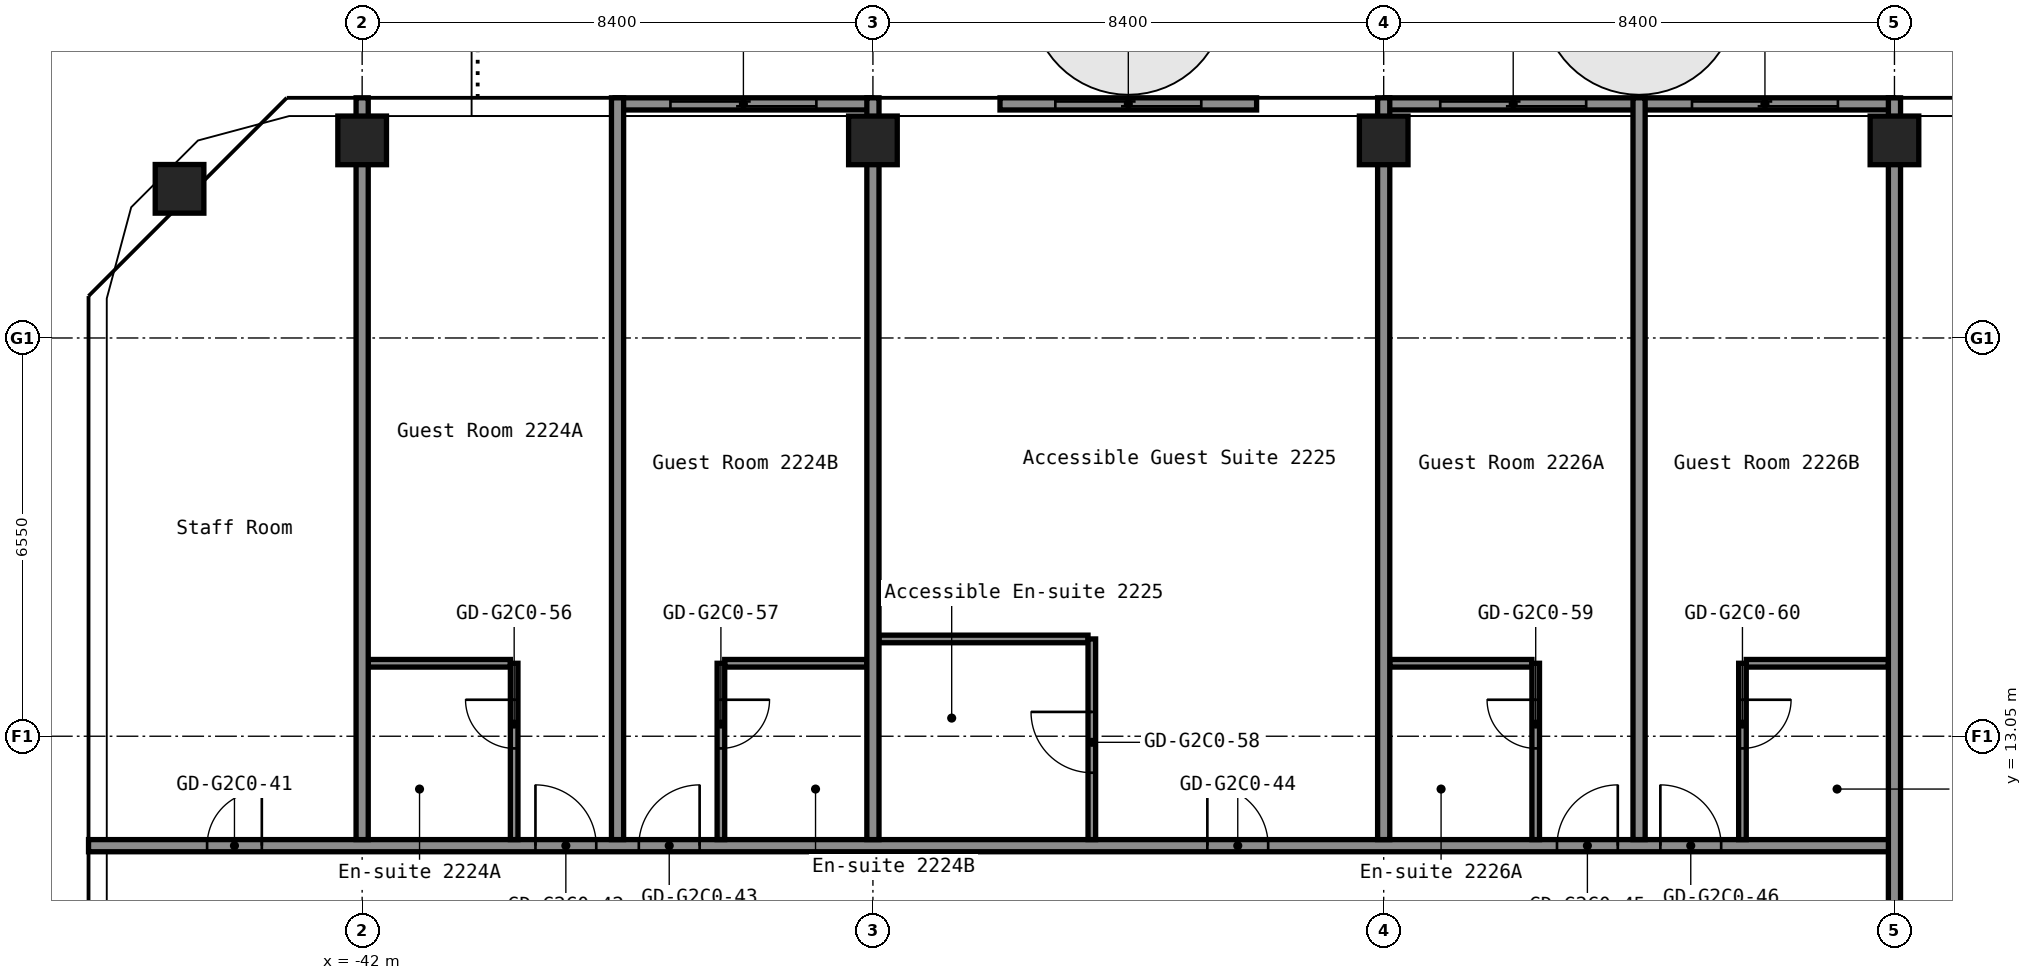
"""IFC4 building model, lengths in metres.
Left out: names, types, materials, properties, quantities, classifications, styles, units other than length and angle.
Written with IfcOpenShell. Run it as: python <this file> out.ifc"""

import sys

from ifc_helpers import new_model, si_unit, direction, frame, frame_2d, origin, origin_2d, place, context, subcontext, project, spatial, rectangle, hollow_rectangle, extrude, element, fill, save


model = new_model("IFC4")
c1 = context("Model", 3, precision=1e-05, world=origin(), true_north=direction((0.0, 1.0)))
c2 = subcontext(c1, "Body", "Model", "MODEL_VIEW")
j1 = project(units=[si_unit("LENGTHUNIT", "METRE"), si_unit("PLANEANGLEUNIT", "RADIAN")], contexts=[c1])
p1 = place(None, origin())
s1 = spatial("IfcSite", under=j1, at=p1, CompositionType="ELEMENT")
p2 = place(p1, origin())
s2 = spatial("IfcBuilding", under=s1, at=p2, CompositionType="ELEMENT")
p3 = place(p2, frame((0.0, 0.0, 81.8)))
s3 = spatial("IfcBuildingStorey", under=s2, at=p3, CompositionType="ELEMENT", Elevation=81.8)
for number, where, z_axis, x_axis in (
    (1, (-45.003, 22.053, 0.0), (0.0, 0.0, 1.0), (1.0, 0.0, 0.0)),
    (2, (-42.0, 22.85, 0.0), (0.0, 0.0, 1.0), (1.0, 0.0, 0.0)),
    (3, (-33.6, 22.85, 0.0), (0.0, 0.0, 1.0), (1.0, 0.0, 0.0)),
    (4, (-25.2, 22.85, 0.0), (0.0, 0.0, 1.0), (1.0, 0.0, 0.0)),
    (5, (-16.8, 22.85, 0.0), (0.0, 0.0, 1.0), (1.0, 0.0, 0.0)),
):
    element("IfcColumn", number, at=place(p3, frame(where, z_axis=z_axis, x_axis=x_axis)), inside=s3, PredefinedType="COLUMN", context=c2, shape_type="SweptSolid", body=[
        extrude(hollow_rectangle(XDim=0.8, YDim=0.8, WallThickness=0.032, at=origin_2d()), origin(), (0.0, 0.0, 1.0), 2.8),
    ])
p4 = place(p3, frame((-46.5, 11.25, 0.0), z_axis=(0.0, 0.0, 1.0), x_axis=(1.0, 0.0, 0.0)))
e6 = element("IfcWall", 6, at=p4, inside=s3, PredefinedType="PARTITIONING", context=c2, shape_type="SweptSolid", body=[
    extrude(rectangle(XDim=29.7, YDim=0.2, at=frame_2d((14.85, 0.0))), origin(), (0.0, 0.0, 1.0), 2.8),
])
p5 = place(p4, frame((1.95, 0.0, 0.0)))
e7 = element("IfcOpeningElement", 7, at=p5, cuts=e6, PredefinedType="OPENING", context=c2, shape_type="SweptSolid", body=[
    extrude(rectangle(XDim=0.9, YDim=2.1, at=frame_2d((0.45, 1.05))), frame((0.0, 0.11, 0.0), z_axis=(0.0, -1.0, 0.0), x_axis=(1.0, 0.0, 0.0)), (0.0, 0.0, 1.0), 0.22),
])
p6 = place(p4, frame((7.35, 0.0, 0.0)))
e8 = element("IfcOpeningElement", 8, at=p6, cuts=e6, PredefinedType="OPENING", context=c2, shape_type="SweptSolid", body=[
    extrude(rectangle(XDim=1.0, YDim=2.1, at=frame_2d((0.5, 1.05))), frame((0.0, 0.11, 0.0), z_axis=(0.0, -1.0, 0.0), x_axis=(1.0, 0.0, 0.0)), (0.0, 0.0, 1.0), 0.22),
])
p7 = place(p4, frame((9.05, 0.0, 0.0)))
e9 = element("IfcOpeningElement", 9, at=p7, cuts=e6, PredefinedType="OPENING", context=c2, shape_type="SweptSolid", body=[
    extrude(rectangle(XDim=1.0, YDim=2.1, at=frame_2d((0.5, 1.05))), frame((0.0, 0.11, 0.0), z_axis=(0.0, -1.0, 0.0), x_axis=(1.0, 0.0, 0.0)), (0.0, 0.0, 1.0), 0.22),
])
p8 = place(p4, frame((18.4, 0.0, 0.0)))
e10 = element("IfcOpeningElement", 10, at=p8, cuts=e6, PredefinedType="OPENING", context=c2, shape_type="SweptSolid", body=[
    extrude(rectangle(XDim=1.0, YDim=2.1, at=frame_2d((0.5, 1.05))), frame((0.0, 0.11, 0.0), z_axis=(0.0, -1.0, 0.0), x_axis=(1.0, 0.0, 0.0)), (0.0, 0.0, 1.0), 0.22),
])
p9 = place(p4, frame((24.15, 0.0, 0.0)))
e11 = element("IfcOpeningElement", 11, at=p9, cuts=e6, PredefinedType="OPENING", context=c2, shape_type="SweptSolid", body=[
    extrude(rectangle(XDim=1.0, YDim=2.1, at=frame_2d((0.5, 1.05))), frame((0.0, 0.11, 0.0), z_axis=(0.0, -1.0, 0.0), x_axis=(1.0, 0.0, 0.0)), (0.0, 0.0, 1.0), 0.22),
])
p10 = place(p4, frame((25.85, 0.0, 0.0)))
e12 = element("IfcOpeningElement", 12, at=p10, cuts=e6, PredefinedType="OPENING", context=c2, shape_type="SweptSolid", body=[
    extrude(rectangle(XDim=1.0, YDim=2.1, at=frame_2d((0.5, 1.05))), frame((0.0, 0.11, 0.0), z_axis=(0.0, -1.0, 0.0), x_axis=(1.0, 0.0, 0.0)), (0.0, 0.0, 1.0), 0.22),
])
p11 = place(p3, frame((-41.9, 14.25, 0.0), z_axis=(0.0, 0.0, 1.0), x_axis=(1.0, 0.0, 0.0)))
e13 = element("IfcWall", 13, at=p11, inside=s3, PredefinedType="PARTITIONING", context=c2, shape_type="SweptSolid", body=[
    extrude(rectangle(XDim=2.337, YDim=0.125, at=frame_2d((1.169, 0.0))), origin(), (0.0, 0.0, 1.0), 2.8),
])
for number, where, z_axis, x_axis in (
    (14, (-36.038, 14.25, 0.0), (0.0, 0.0, 1.0), (1.0, 0.0, 0.0)),
    (15, (-25.1, 14.25, 0.0), (0.0, 0.0, 1.0), (1.0, 0.0, 0.0)),
    (16, (-19.238, 14.25, 0.0), (0.0, 0.0, 1.0), (1.0, 0.0, 0.0)),
):
    element("IfcWall", number, at=place(p3, frame(where, z_axis=z_axis, x_axis=x_axis)), inside=s3, PredefinedType="PARTITIONING", context=c2, shape_type="SweptSolid", body=[
        extrude(rectangle(XDim=2.338, YDim=0.125, at=frame_2d((1.169, 0.0))), origin(), (0.0, 0.0, 1.0), 2.8),
    ])
p12 = place(p3, frame((-33.5, 14.65, 0.0), z_axis=(0.0, 0.0, 1.0), x_axis=(1.0, 0.0, 0.0)))
e17 = element("IfcWall", 17, at=p12, inside=s3, PredefinedType="PARTITIONING", context=c2, shape_type="SweptSolid", body=[
    extrude(rectangle(XDim=3.438, YDim=0.125, at=frame_2d((1.719, 0.0))), origin(), (0.0, 0.0, 1.0), 2.8),
])
p13 = place(p3, frame((-42.0, 11.35, 0.0), z_axis=(0.0, 0.0, 1.0), x_axis=(0.0, 1.0, 0.0)))
e18 = element("IfcWall", 18, at=p13, inside=s3, PredefinedType="PARTITIONING", context=c2, shape_type="SweptSolid", body=[
    extrude(rectangle(XDim=12.2, YDim=0.2, at=frame_2d((6.1, 0.0))), origin(), (0.0, 0.0, 1.0), 2.8),
])
p14 = place(p3, frame((-39.5, 11.35, 0.0), z_axis=(0.0, 0.0, 1.0), x_axis=(0.0, 1.0, 0.0)))
e19 = element("IfcWall", 19, at=p14, inside=s3, PredefinedType="PARTITIONING", context=c2, shape_type="SweptSolid", body=[
    extrude(rectangle(XDim=2.9, YDim=0.125, at=frame_2d((1.45, 0.0))), origin(), (0.0, 0.0, 1.0), 2.8),
])
p15 = place(p14, frame((1.5, 0.0, 0.0)))
e20 = element("IfcOpeningElement", 20, at=p15, cuts=e19, PredefinedType="OPENING", context=c2, shape_type="SweptSolid", body=[
    extrude(rectangle(XDim=0.8, YDim=2.1, at=frame_2d((0.4, 1.05))), frame((0.0, 0.073, 0.0), z_axis=(0.0, -1.0, 0.0), x_axis=(1.0, 0.0, 0.0)), (0.0, 0.0, 1.0), 0.145),
])
p16 = place(p3, frame((-37.8, 11.35, 0.0), z_axis=(0.0, 0.0, 1.0), x_axis=(0.0, 1.0, 0.0)))
e21 = element("IfcWall", 21, at=p16, inside=s3, PredefinedType="PARTITIONING", context=c2, shape_type="SweptSolid", body=[
    extrude(rectangle(XDim=12.2, YDim=0.2, at=frame_2d((6.1, 0.0))), origin(), (0.0, 0.0, 1.0), 2.8),
])
p17 = place(p3, frame((-36.1, 11.35, 0.0), z_axis=(0.0, 0.0, 1.0), x_axis=(0.0, 1.0, 0.0)))
e22 = element("IfcWall", 22, at=p17, inside=s3, PredefinedType="PARTITIONING", context=c2, shape_type="SweptSolid", body=[
    extrude(rectangle(XDim=2.9, YDim=0.125, at=frame_2d((1.45, 0.0))), origin(), (0.0, 0.0, 1.0), 2.8),
])
p18 = place(p17, frame((1.5, 0.0, 0.0)))
e23 = element("IfcOpeningElement", 23, at=p18, cuts=e22, PredefinedType="OPENING", context=c2, shape_type="SweptSolid", body=[
    extrude(rectangle(XDim=0.8, YDim=2.1, at=frame_2d((0.4, 1.05))), frame((0.0, 0.073, 0.0), z_axis=(0.0, -1.0, 0.0), x_axis=(1.0, 0.0, 0.0)), (0.0, 0.0, 1.0), 0.145),
])
p19 = place(p3, frame((-33.6, 11.35, 0.0), z_axis=(0.0, 0.0, 1.0), x_axis=(0.0, 1.0, 0.0)))
e24 = element("IfcWall", 24, at=p19, inside=s3, PredefinedType="PARTITIONING", context=c2, shape_type="SweptSolid", body=[
    extrude(rectangle(XDim=12.2, YDim=0.2, at=frame_2d((6.1, 0.0))), origin(), (0.0, 0.0, 1.0), 2.8),
])
p20 = place(p3, frame((-30.0, 11.35, 0.0), z_axis=(0.0, 0.0, 1.0), x_axis=(0.0, 1.0, 0.0)))
e25 = element("IfcWall", 25, at=p20, inside=s3, PredefinedType="PARTITIONING", context=c2, shape_type="SweptSolid", body=[
    extrude(rectangle(XDim=3.3, YDim=0.125, at=frame_2d((1.65, 0.0))), origin(), (0.0, 0.0, 1.0), 2.8),
])
p21 = place(p20, frame((1.1, 0.0, 0.0)))
e26 = element("IfcOpeningElement", 26, at=p21, cuts=e25, PredefinedType="OPENING", context=c2, shape_type="SweptSolid", body=[
    extrude(rectangle(XDim=1.0, YDim=2.1, at=frame_2d((0.5, 1.05))), frame((0.0, 0.073, 0.0), z_axis=(0.0, -1.0, 0.0), x_axis=(1.0, 0.0, 0.0)), (0.0, 0.0, 1.0), 0.145),
])
p22 = place(p3, frame((-25.2, 11.35, 0.0), z_axis=(0.0, 0.0, 1.0), x_axis=(0.0, 1.0, 0.0)))
e27 = element("IfcWall", 27, at=p22, inside=s3, PredefinedType="PARTITIONING", context=c2, shape_type="SweptSolid", body=[
    extrude(rectangle(XDim=12.2, YDim=0.2, at=frame_2d((6.1, 0.0))), origin(), (0.0, 0.0, 1.0), 2.8),
])
p23 = place(p3, frame((-22.7, 11.35, 0.0), z_axis=(0.0, 0.0, 1.0), x_axis=(0.0, 1.0, 0.0)))
e28 = element("IfcWall", 28, at=p23, inside=s3, PredefinedType="PARTITIONING", context=c2, shape_type="SweptSolid", body=[
    extrude(rectangle(XDim=2.9, YDim=0.125, at=frame_2d((1.45, 0.0))), origin(), (0.0, 0.0, 1.0), 2.8),
])
p24 = place(p23, frame((1.5, 0.0, 0.0)))
e29 = element("IfcOpeningElement", 29, at=p24, cuts=e28, PredefinedType="OPENING", context=c2, shape_type="SweptSolid", body=[
    extrude(rectangle(XDim=0.8, YDim=2.1, at=frame_2d((0.4, 1.05))), frame((0.0, 0.073, 0.0), z_axis=(0.0, -1.0, 0.0), x_axis=(1.0, 0.0, 0.0)), (0.0, 0.0, 1.0), 0.145),
])
p25 = place(p3, frame((-21.0, 11.35, 0.0), z_axis=(0.0, 0.0, 1.0), x_axis=(0.0, 1.0, 0.0)))
e30 = element("IfcWall", 30, at=p25, inside=s3, PredefinedType="PARTITIONING", context=c2, shape_type="SweptSolid", body=[
    extrude(rectangle(XDim=12.2, YDim=0.2, at=frame_2d((6.1, 0.0))), origin(), (0.0, 0.0, 1.0), 2.8),
])
p26 = place(p3, frame((-19.3, 11.35, 0.0), z_axis=(0.0, 0.0, 1.0), x_axis=(0.0, 1.0, 0.0)))
e31 = element("IfcWall", 31, at=p26, inside=s3, PredefinedType="PARTITIONING", context=c2, shape_type="SweptSolid", body=[
    extrude(rectangle(XDim=2.9, YDim=0.125, at=frame_2d((1.45, 0.0))), origin(), (0.0, 0.0, 1.0), 2.8),
])
p27 = place(p26, frame((1.5, 0.0, 0.0)))
e32 = element("IfcOpeningElement", 32, at=p27, cuts=e31, PredefinedType="OPENING", context=c2, shape_type="SweptSolid", body=[
    extrude(rectangle(XDim=0.8, YDim=2.1, at=frame_2d((0.4, 1.05))), frame((0.0, 0.073, 0.0), z_axis=(0.0, -1.0, 0.0), x_axis=(1.0, 0.0, 0.0)), (0.0, 0.0, 1.0), 0.145),
])
p28 = place(p3, frame((-16.8, 10.19, 0.0), z_axis=(0.0, 0.0, 1.0), x_axis=(0.0, 1.0, 0.0)))
e33 = element("IfcWall", 33, at=p28, inside=s3, PredefinedType="PARTITIONING", context=c2, shape_type="SweptSolid", body=[
    extrude(rectangle(XDim=13.36, YDim=0.2, at=frame_2d((6.68, 0.0))), origin(), (0.0, 0.0, 1.0), 2.8),
])
p29 = place(p3, frame((-16.82, 23.45, 0.0), z_axis=(0.0, 0.0, 1.0), x_axis=(-1.0, 0.0, 0.0)))
p30 = place(p29, frame((0.91, 0.0, 0.0)))
p31 = place(p30, frame((2.4, 0.0, 0.0), z_axis=(0.0, 0.0, 1.0), x_axis=(-1.0, 0.0, 0.0)))
e34 = element("IfcDoor", 34, at=p31, inside=s3, OperationType="SLIDING_TO_LEFT", PredefinedType="DOOR", context=c2, shape_type="SweptSolid", body=[
    extrude(rectangle(XDim=2.4, YDim=2.2, at=frame_2d((1.2, 1.1))), frame((0.0, 0.025, 0.0), z_axis=(0.0, -1.0, 0.0), x_axis=(1.0, 0.0, 0.0)), (0.0, 0.0, 1.0), 0.05),
])
p32 = place(p3, frame((-20.96, 23.45, 0.0), z_axis=(0.0, 0.0, 1.0), x_axis=(-1.0, 0.0, 0.0)))
p33 = place(p32, frame((0.91, 0.0, 0.0)))
p34 = place(p33, frame((2.4, 0.0, 0.0), z_axis=(0.0, 0.0, 1.0), x_axis=(-1.0, 0.0, 0.0)))
e35 = element("IfcDoor", 35, at=p34, inside=s3, OperationType="SLIDING_TO_LEFT", PredefinedType="DOOR", context=c2, shape_type="SweptSolid", body=[
    extrude(rectangle(XDim=2.4, YDim=2.2, at=frame_2d((1.2, 1.1))), frame((0.0, 0.025, 0.0), z_axis=(0.0, -1.0, 0.0), x_axis=(1.0, 0.0, 0.0)), (0.0, 0.0, 1.0), 0.05),
])
p35 = place(p3, frame((-27.29, 23.45, 0.0), z_axis=(0.0, 0.0, 1.0), x_axis=(-1.0, 0.0, 0.0)))
p36 = place(p35, frame((0.91, 0.0, 0.0)))
p37 = place(p36, frame((2.4, 0.0, 0.0), z_axis=(0.0, 0.0, 1.0), x_axis=(-1.0, 0.0, 0.0)))
e36 = element("IfcDoor", 36, at=p37, inside=s3, OperationType="SLIDING_TO_LEFT", PredefinedType="DOOR", context=c2, shape_type="SweptSolid", body=[
    extrude(rectangle(XDim=2.4, YDim=2.2, at=frame_2d((1.2, 1.1))), frame((0.0, 0.025, 0.0), z_axis=(0.0, -1.0, 0.0), x_axis=(1.0, 0.0, 0.0)), (0.0, 0.0, 1.0), 0.05),
])
p38 = place(p3, frame((-33.62, 23.45, 0.0), z_axis=(0.0, 0.0, 1.0), x_axis=(-1.0, 0.0, 0.0)))
p39 = place(p38, frame((0.91, 0.0, 0.0)))
p40 = place(p39, frame((2.4, 0.0, 0.0), z_axis=(0.0, 0.0, 1.0), x_axis=(-1.0, 0.0, 0.0)))
e37 = element("IfcDoor", 37, at=p40, inside=s3, OperationType="SLIDING_TO_LEFT", PredefinedType="DOOR", context=c2, shape_type="SweptSolid", body=[
    extrude(rectangle(XDim=2.4, YDim=2.2, at=frame_2d((1.2, 1.1))), frame((0.0, 0.025, 0.0), z_axis=(0.0, -1.0, 0.0), x_axis=(1.0, 0.0, 0.0)), (0.0, 0.0, 1.0), 0.05),
])
p41 = place(p5, origin())
e38 = element("IfcDoor", 38, at=p41, inside=s3, OperationType="SINGLE_SWING_LEFT", PredefinedType="DOOR", context=c2, shape_type="SweptSolid", body=[
    extrude(rectangle(XDim=0.9, YDim=2.1, at=frame_2d((0.45, 1.05))), frame((0.0, 0.025, 0.0), z_axis=(0.0, -1.0, 0.0), x_axis=(1.0, 0.0, 0.0)), (0.0, 0.0, 1.0), 0.05),
])
fill(e7, e38)
p42 = place(p6, origin())
e39 = element("IfcDoor", 39, at=p42, inside=s3, OperationType="SINGLE_SWING_RIGHT", PredefinedType="DOOR", context=c2, shape_type="SweptSolid", body=[
    extrude(rectangle(XDim=1.0, YDim=2.1, at=frame_2d((0.5, 1.05))), frame((0.0, 0.025, 0.0), z_axis=(0.0, -1.0, 0.0), x_axis=(1.0, 0.0, 0.0)), (0.0, 0.0, 1.0), 0.05),
])
fill(e8, e39)
p43 = place(p7, origin())
e40 = element("IfcDoor", 40, at=p43, inside=s3, OperationType="SINGLE_SWING_LEFT", PredefinedType="DOOR", context=c2, shape_type="SweptSolid", body=[
    extrude(rectangle(XDim=1.0, YDim=2.1, at=frame_2d((0.5, 1.05))), frame((0.0, 0.025, 0.0), z_axis=(0.0, -1.0, 0.0), x_axis=(1.0, 0.0, 0.0)), (0.0, 0.0, 1.0), 0.05),
])
fill(e9, e40)
p44 = place(p8, origin())
e41 = element("IfcDoor", 41, at=p44, inside=s3, OperationType="SINGLE_SWING_RIGHT", PredefinedType="DOOR", context=c2, shape_type="SweptSolid", body=[
    extrude(rectangle(XDim=1.0, YDim=2.1, at=frame_2d((0.5, 1.05))), frame((0.0, 0.025, 0.0), z_axis=(0.0, -1.0, 0.0), x_axis=(1.0, 0.0, 0.0)), (0.0, 0.0, 1.0), 0.05),
])
fill(e10, e41)
p45 = place(p9, origin())
e42 = element("IfcDoor", 42, at=p45, inside=s3, OperationType="SINGLE_SWING_LEFT", PredefinedType="DOOR", context=c2, shape_type="SweptSolid", body=[
    extrude(rectangle(XDim=1.0, YDim=2.1, at=frame_2d((0.5, 1.05))), frame((0.0, 0.025, 0.0), z_axis=(0.0, -1.0, 0.0), x_axis=(1.0, 0.0, 0.0)), (0.0, 0.0, 1.0), 0.05),
])
fill(e11, e42)
p46 = place(p10, origin())
e43 = element("IfcDoor", 43, at=p46, inside=s3, OperationType="SINGLE_SWING_RIGHT", PredefinedType="DOOR", context=c2, shape_type="SweptSolid", body=[
    extrude(rectangle(XDim=1.0, YDim=2.1, at=frame_2d((0.5, 1.05))), frame((0.0, 0.025, 0.0), z_axis=(0.0, -1.0, 0.0), x_axis=(1.0, 0.0, 0.0)), (0.0, 0.0, 1.0), 0.05),
])
fill(e12, e43)
p47 = place(p15, origin())
e44 = element("IfcDoor", 44, at=p47, inside=s3, OperationType="SINGLE_SWING_LEFT", PredefinedType="DOOR", context=c2, shape_type="SweptSolid", body=[
    extrude(rectangle(XDim=0.8, YDim=2.1, at=frame_2d((0.4, 1.05))), frame((0.0, 0.025, 0.0), z_axis=(0.0, -1.0, 0.0), x_axis=(1.0, 0.0, 0.0)), (0.0, 0.0, 1.0), 0.05),
])
fill(e20, e44)
p48 = place(p18, origin())
e45 = element("IfcDoor", 45, at=p48, inside=s3, OperationType="SINGLE_SWING_RIGHT", PredefinedType="DOOR", context=c2, shape_type="SweptSolid", body=[
    extrude(rectangle(XDim=0.8, YDim=2.1, at=frame_2d((0.4, 1.05))), frame((0.0, 0.025, 0.0), z_axis=(0.0, -1.0, 0.0), x_axis=(1.0, 0.0, 0.0)), (0.0, 0.0, 1.0), 0.05),
])
fill(e23, e45)
p49 = place(p21, origin())
e46 = element("IfcDoor", 46, at=p49, inside=s3, OperationType="SINGLE_SWING_LEFT", PredefinedType="DOOR", context=c2, shape_type="SweptSolid", body=[
    extrude(rectangle(XDim=1.0, YDim=2.1, at=frame_2d((0.5, 1.05))), frame((0.0, 0.025, 0.0), z_axis=(0.0, -1.0, 0.0), x_axis=(1.0, 0.0, 0.0)), (0.0, 0.0, 1.0), 0.05),
])
fill(e26, e46)
p50 = place(p24, origin())
e47 = element("IfcDoor", 47, at=p50, inside=s3, OperationType="SINGLE_SWING_LEFT", PredefinedType="DOOR", context=c2, shape_type="SweptSolid", body=[
    extrude(rectangle(XDim=0.8, YDim=2.1, at=frame_2d((0.4, 1.05))), frame((0.0, 0.025, 0.0), z_axis=(0.0, -1.0, 0.0), x_axis=(1.0, 0.0, 0.0)), (0.0, 0.0, 1.0), 0.05),
])
fill(e29, e47)
p51 = place(p27, origin())
e48 = element("IfcDoor", 48, at=p51, inside=s3, OperationType="SINGLE_SWING_RIGHT", PredefinedType="DOOR", context=c2, shape_type="SweptSolid", body=[
    extrude(rectangle(XDim=0.8, YDim=2.1, at=frame_2d((0.4, 1.05))), frame((0.0, 0.025, 0.0), z_axis=(0.0, -1.0, 0.0), x_axis=(1.0, 0.0, 0.0)), (0.0, 0.0, 1.0), 0.05),
])
fill(e32, e48)
save(model, sys.argv[1])
